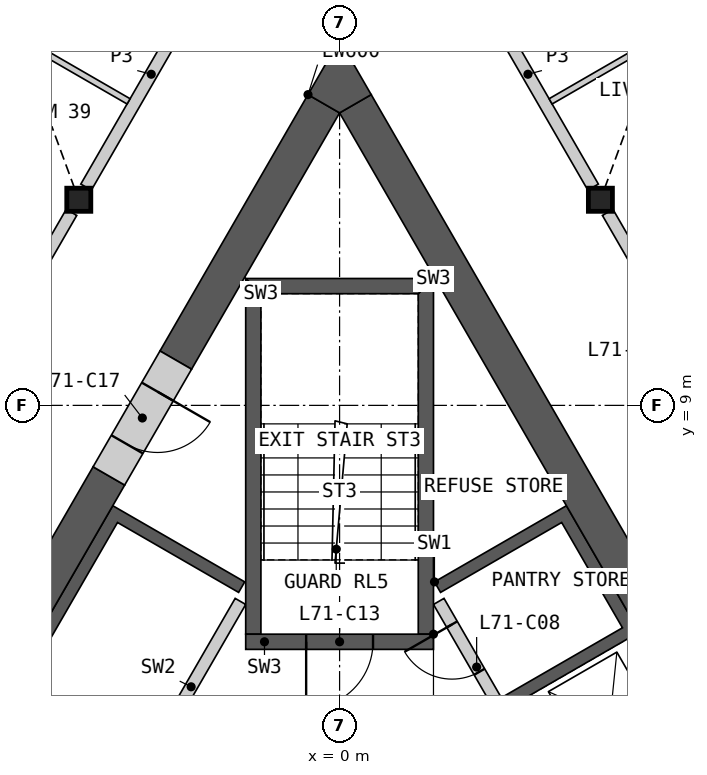
"""IFC4 building model, lengths in metres.
Left out: names, types, materials, properties, quantities, classifications, styles, units other than length and angle.
Written with IfcOpenShell. Run it as: python <this file> out.ifc"""

import sys

from ifc_helpers import new_model, si_unit, direction, frame, frame_2d, origin, origin_2d, place, context, subcontext, project, spatial, polyline, rectangle, i_section, outline, extrude, element, fill, save


model = new_model("IFC4")
c1 = context("Model", 3, precision=1e-05, world=origin(), true_north=direction((0.0, 1.0)))
c2 = subcontext(c1, "Body", "Model", "MODEL_VIEW")
j1 = project(units=[si_unit("LENGTHUNIT", "METRE"), si_unit("PLANEANGLEUNIT", "RADIAN")], contexts=[c1])
p1 = place(None, origin())
s1 = spatial("IfcSite", under=j1, at=p1, CompositionType="ELEMENT")
p2 = place(p1, origin())
s2 = spatial("IfcBuilding", under=s1, at=p2, CompositionType="ELEMENT")
p3 = place(p2, frame((0.0, 0.0, 322.2)))
s3 = spatial("IfcBuildingStorey", under=s2, at=p3, CompositionType="ELEMENT", Elevation=322.2)
for number, where, z_axis, x_axis in (
    (1, (-4.289, 12.382, 0.0), (0.0, 0.0, 1.0), (1.0, 0.0, 0.0)),
    (2, (4.289, 12.382, 0.0), (0.0, 0.0, 1.0), (1.0, 0.0, 0.0)),
):
    element("IfcColumn", number, at=place(p3, frame(where, z_axis=z_axis, x_axis=x_axis)), inside=s3, PredefinedType="COLUMN", context=c2, shape_type="SweptSolid", body=[
        extrude(i_section(OverallWidth=0.396, OverallDepth=0.381, WebThickness=0.019, FlangeThickness=0.03, at=origin_2d()), origin(), (0.0, 0.0, 1.0), 3.4),
    ])
p4 = place(p3, origin())
e3 = element("IfcWall", 3, at=p4, inside=s3, PredefinedType="SHEAR", context=c2, shape_type="SweptSolid", body=[
    extrude(outline(polyline([(1.561, 6.097), (3.731, 7.35), (8.231, -0.444), (6.061, -1.697), (5.96, -1.524), (7.952, -0.374), (6.952, 1.358), (4.96, 0.208), (4.861, 0.381), (6.852, 1.531), (5.852, 3.263), (3.861, 2.113), (3.76, 2.287), (5.752, 3.437), (4.752, 5.169), (2.76, 4.019), (2.66, 4.192), (4.652, 5.342), (3.652, 7.074), (1.66, 5.924), (1.561, 6.097)])), origin(), (0.0, 0.0, 1.0), 3.1),
])
p5 = place(p3, frame((5.817, -1.476, 0.0), z_axis=(0.0, 0.0, 1.0), x_axis=(-0.500002616675, 0.866023893041, 0.0)))
e4 = element("IfcWall", 4, at=p5, inside=s3, PredefinedType="SOLIDWALL", context=c2, shape_type="SweptSolid", body=[
    extrude(rectangle(XDim=8.373, YDim=0.2, at=frame_2d((4.187, 0.0))), origin(), (0.0, 0.0, 1.0), 3.1),
])
p6 = place(p5, frame((0.337, 0.0, 0.0)))
e5 = element("IfcOpeningElement", 5, at=p6, cuts=e4, PredefinedType="OPENING", context=c2, shape_type="SweptSolid", body=[
    extrude(rectangle(XDim=1.1, YDim=2.1, at=frame_2d((0.55, 1.05))), frame((0.0, 0.11, 0.0), z_axis=(0.0, -1.0, 0.0), x_axis=(1.0, 0.0, 0.0)), (0.0, 0.0, 1.0), 0.22),
])
p7 = place(p5, frame((2.537, 0.0, 0.0)))
e6 = element("IfcOpeningElement", 6, at=p7, cuts=e4, PredefinedType="OPENING", context=c2, shape_type="SweptSolid", body=[
    extrude(rectangle(XDim=1.1, YDim=2.1, at=frame_2d((0.55, 1.05))), frame((0.0, 0.11, 0.0), z_axis=(0.0, -1.0, 0.0), x_axis=(1.0, 0.0, 0.0)), (0.0, 0.0, 1.0), 0.22),
])
p8 = place(p5, frame((4.737, 0.0, 0.0)))
e7 = element("IfcOpeningElement", 7, at=p8, cuts=e4, PredefinedType="OPENING", context=c2, shape_type="SweptSolid", body=[
    extrude(rectangle(XDim=1.1, YDim=2.1, at=frame_2d((0.55, 1.05))), frame((0.0, 0.11, 0.0), z_axis=(0.0, -1.0, 0.0), x_axis=(1.0, 0.0, 0.0)), (0.0, 0.0, 1.0), 0.22),
])
p9 = place(p5, frame((7.037, 0.0, 0.0)))
e8 = element("IfcOpeningElement", 8, at=p9, cuts=e4, PredefinedType="OPENING", context=c2, shape_type="SweptSolid", body=[
    extrude(rectangle(XDim=0.9, YDim=2.1, at=frame_2d((0.45, 1.05))), frame((0.0, 0.11, 0.0), z_axis=(0.0, -1.0, 0.0), x_axis=(1.0, 0.0, 0.0)), (0.0, 0.0, 1.0), 0.22),
])
p10 = place(p3, origin())
e9 = element("IfcWall", 9, at=p10, inside=s3, PredefinedType="SHEAR", context=c2, shape_type="SweptSolid", body=[
    extrude(outline(polyline([(-4.96, 0.208), (-7.131, 1.461), (-3.731, 7.35), (-1.561, 6.097), (-1.66, 5.924), (-3.652, 7.074), (-6.852, 1.531), (-4.861, 0.381), (-4.96, 0.208)])), origin(), (0.0, 0.0, 1.0), 3.1),
])
p11 = place(p3, frame((-1.631, 5.776, 0.0), z_axis=(0.0, 0.0, 1.0), x_axis=(-0.499992876559, -0.866029516466, 0.0)))
e10 = element("IfcWall", 10, at=p11, inside=s3, PredefinedType="SOLIDWALL", context=c2, shape_type="SweptSolid", body=[
    extrude(rectangle(XDim=6.486, YDim=0.2, at=frame_2d((3.243, 0.0))), origin(), (0.0, 0.0, 1.0), 3.1),
])
p12 = place(p11, frame((2.637, 0.0, 0.0)))
e11 = element("IfcOpeningElement", 11, at=p12, cuts=e10, PredefinedType="OPENING", context=c2, shape_type="SweptSolid", body=[
    extrude(rectangle(XDim=0.9, YDim=2.1, at=frame_2d((0.45, 1.05))), frame((0.0, 0.11, 0.0), z_axis=(0.0, -1.0, 0.0), x_axis=(1.0, 0.0, 0.0)), (0.0, 0.0, 1.0), 0.22),
])
p13 = place(p3, origin())
e12 = element("IfcWall", 12, at=p13, inside=s3, PredefinedType="SHEAR", context=c2, shape_type="SweptSolid", body=[
    extrude(outline(polyline([(1.544, 5.237), (1.544, 11.087), (1.294, 10.837), (1.294, 5.237), (1.544, 5.237)])), origin(), (0.0, 0.0, 1.0), 3.1),
])
p14 = place(p3, origin())
e13 = element("IfcWall", 13, at=p14, inside=s3, PredefinedType="SHEAR", context=c2, shape_type="SweptSolid", body=[
    extrude(outline(polyline([(1.544, 11.087), (-1.544, 11.087), (-1.294, 10.837), (1.294, 10.837), (1.544, 11.087)])), origin(), (0.0, 0.0, 1.0), 3.1),
])
p15 = place(p3, origin())
e14 = element("IfcWall", 14, at=p15, inside=s3, PredefinedType="SHEAR", context=c2, shape_type="SweptSolid", body=[
    extrude(outline(polyline([(-1.294, 10.837), (-1.544, 11.087), (-1.544, 5.237), (-1.294, 5.237), (-1.294, 10.837)])), origin(), (0.0, 0.0, 1.0), 3.1),
])
p16 = place(p3, frame((1.544, 5.112, 0.0), z_axis=(0.0, 0.0, 1.0), x_axis=(-1.0, 0.0, 0.0)))
e15 = element("IfcWall", 15, at=p16, inside=s3, PredefinedType="SHEAR", context=c2, shape_type="SweptSolid", body=[
    extrude(rectangle(XDim=3.088, YDim=0.25, at=frame_2d((1.544, 0.0))), origin(), (0.0, 0.0, 1.0), 3.1),
])
p17 = place(p16, frame((0.994, 0.0, 0.0)))
e16 = element("IfcOpeningElement", 16, at=p17, cuts=e15, PredefinedType="OPENING", context=c2, shape_type="SweptSolid", body=[
    extrude(rectangle(XDim=1.1, YDim=2.1, at=frame_2d((0.55, 1.05))), frame((0.0, 0.135, 0.0), z_axis=(0.0, -1.0, 0.0), x_axis=(1.0, 0.0, 0.0)), (0.0, 0.0, 1.0), 0.27),
])
p18 = place(p3, frame((8.686, -0.634, 0.0), z_axis=(0.0, 0.0, 1.0), x_axis=(-0.500004601921, 0.866022746848, 0.0)))
e17 = element("IfcWall", 17, at=p18, inside=s3, PredefinedType="SHEAR", context=c2, shape_type="SweptSolid", body=[
    extrude(rectangle(XDim=16.853, YDim=0.6, at=frame_2d((8.426, 0.0))), origin(), (0.0, 0.0, 1.0), 3.1),
])
p19 = place(p3, frame((-3.794, 7.84, 0.0), z_axis=(0.0, 0.0, 1.0), x_axis=(-0.499974747889, -0.866039982607, 0.0)))
e18 = element("IfcWall", 18, at=p19, inside=s3, PredefinedType="SHEAR", context=c2, shape_type="SweptSolid", body=[
    extrude(rectangle(XDim=7.092, YDim=0.6, at=frame_2d((3.546, 0.0))), origin(), (0.0, 0.0, 1.0), 3.1),
])
p20 = place(p3, frame((-0.26, 13.961, 0.0), z_axis=(0.0, 0.0, 1.0), x_axis=(-0.50000604952, -0.866021911064, 0.0)))
e19 = element("IfcWall", 19, at=p20, inside=s3, PredefinedType="SHEAR", context=c2, shape_type="SweptSolid", body=[
    extrude(rectangle(XDim=4.869, YDim=0.6, at=frame_2d((2.434, 0.0))), origin(), (0.0, 0.0, 1.0), 3.1),
])
p21 = place(p3, origin())
e20 = element("IfcWall", 20, at=p21, inside=s3, PredefinedType="SHEAR", context=c2, shape_type="SweptSolid", body=[
    extrude(outline(polyline([(-0.52, 14.111), (0.0, 15.011), (0.52, 14.111), (0.0, 13.811), (-0.52, 14.111)])), origin(), (0.0, 0.0, 1.0), 3.1),
])
p22 = place(p3, frame((-2.694, 9.745, 0.0), z_axis=(0.0, 0.0, 1.0), x_axis=(-0.50002983664, -0.866008176907, 0.0)))
e21 = element("IfcWall", 21, at=p22, inside=s3, PredefinedType="SHEAR", context=c2, shape_type="SweptSolid", body=[
    extrude(rectangle(XDim=2.2, YDim=0.6, at=frame_2d((1.1, 0.0))), origin(), (0.0, 0.0, 1.0), 3.1),
])
p23 = place(p22, frame((0.6, 0.0, 0.0)))
e22 = element("IfcOpeningElement", 22, at=p23, cuts=e21, PredefinedType="OPENING", context=c2, shape_type="SweptSolid", body=[
    extrude(rectangle(XDim=1.0, YDim=2.1, at=frame_2d((0.5, 1.05))), frame((0.0, 0.31, 0.0), z_axis=(0.0, -1.0, 0.0), x_axis=(1.0, 0.0, 0.0)), (0.0, 0.0, 1.0), 0.62),
])
p24 = place(p3, frame((4.409, 12.174, 0.0), z_axis=(0.0, 0.0, 1.0), x_axis=(0.499984266882, -0.866034487114, 0.0)))
e23 = element("IfcWall", 23, at=p24, inside=s3, PredefinedType="PARTITIONING", context=c2, shape_type="SweptSolid", body=[
    extrude(rectangle(XDim=8.099, YDim=0.2, at=frame_2d((4.049, 0.0))), origin(), (0.0, 0.0, 1.0), 3.1),
])
p25 = place(p24, frame((6.269, 0.0, 0.0)))
e24 = element("IfcOpeningElement", 24, at=p25, cuts=e23, PredefinedType="OPENING", context=c2, shape_type="SweptSolid", body=[
    extrude(rectangle(XDim=1.0, YDim=2.1, at=frame_2d((0.5, 1.05))), frame((0.0, 0.11, 0.0), z_axis=(0.0, -1.0, 0.0), x_axis=(1.0, 0.0, 0.0)), (0.0, 0.0, 1.0), 0.22),
])
p26 = place(p24, frame((1.164, 0.0, 0.0)))
e25 = element("IfcOpeningElement", 25, at=p26, cuts=e23, PredefinedType="OPENING", context=c2, shape_type="SweptSolid", body=[
    extrude(rectangle(XDim=1.0, YDim=2.1, at=frame_2d((0.5, 1.05))), frame((0.0, 0.11, 0.0), z_axis=(0.0, -1.0, 0.0), x_axis=(1.0, 0.0, 0.0)), (0.0, 0.0, 1.0), 0.22),
])
p27 = place(p3, frame((-8.458, 5.16, 0.0), z_axis=(0.0, 0.0, 1.0), x_axis=(0.499984266882, 0.866034487114, 0.0)))
e26 = element("IfcWall", 26, at=p27, inside=s3, PredefinedType="PARTITIONING", context=c2, shape_type="SweptSolid", body=[
    extrude(rectangle(XDim=8.099, YDim=0.2, at=frame_2d((4.049, 0.0))), origin(), (0.0, 0.0, 1.0), 3.1),
])
p28 = place(p27, frame((5.935, 0.0, 0.0)))
e27 = element("IfcOpeningElement", 27, at=p28, cuts=e26, PredefinedType="OPENING", context=c2, shape_type="SweptSolid", body=[
    extrude(rectangle(XDim=1.0, YDim=2.1, at=frame_2d((0.5, 1.05))), frame((0.0, 0.11, 0.0), z_axis=(0.0, -1.0, 0.0), x_axis=(1.0, 0.0, 0.0)), (0.0, 0.0, 1.0), 0.22),
])
p29 = place(p27, frame((0.83, 0.0, 0.0)))
e28 = element("IfcOpeningElement", 28, at=p29, cuts=e26, PredefinedType="OPENING", context=c2, shape_type="SweptSolid", body=[
    extrude(rectangle(XDim=1.0, YDim=2.1, at=frame_2d((0.5, 1.05))), frame((0.0, 0.11, 0.0), z_axis=(0.0, -1.0, 0.0), x_axis=(1.0, 0.0, 0.0)), (0.0, 0.0, 1.0), 0.22),
])
for number, where, z_axis, x_axis in (
    (29, (2.025, 16.303, 0.0), (0.0, 0.0, 1.0), (0.5, -0.866, 0.0)),
    (30, (-4.169, 12.59, 0.0), (0.0, 0.0, 1.0), (0.5, 0.866, 0.0)),
):
    element("IfcWall", number, at=place(p3, frame(where, z_axis=z_axis, x_axis=x_axis)), inside=s3, PredefinedType="PARTITIONING", context=c2, shape_type="SweptSolid", body=[
        extrude(rectangle(XDim=4.288, YDim=0.2, at=frame_2d((2.144, 0.0))), origin(), (0.0, 0.0, 1.0), 3.1),
    ])
p30 = place(p3, frame((-14.417, 20.32, 0.0), z_axis=(0.0, 0.0, 1.0), x_axis=(0.866021216079, -0.500007253249, 0.0)))
e31 = element("IfcWall", 31, at=p30, inside=s3, PredefinedType="PARTITIONING", context=c2, shape_type="SweptSolid", body=[
    extrude(rectangle(XDim=12.639, YDim=0.1, at=frame_2d((6.32, 0.0))), origin(), (0.0, 0.0, 1.0), 2.33),
])
p31 = place(p30, frame((3.375, 0.0, 0.0)))
e32 = element("IfcOpeningElement", 32, at=p31, cuts=e31, PredefinedType="OPENING", context=c2, shape_type="SweptSolid", body=[
    extrude(rectangle(XDim=0.95, YDim=2.1, at=frame_2d((0.475, 1.05))), frame((0.0, 0.06, 0.0), z_axis=(0.0, -1.0, 0.0), x_axis=(1.0, 0.0, 0.0)), (0.0, 0.0, 1.0), 0.12),
])
p32 = place(p3, frame((3.47, 14.0, 0.0), z_axis=(0.0, 0.0, 1.0), x_axis=(0.866021216079, 0.500007253249, 0.0)))
e33 = element("IfcWall", 33, at=p32, inside=s3, PredefinedType="PARTITIONING", context=c2, shape_type="SweptSolid", body=[
    extrude(rectangle(XDim=12.639, YDim=0.1, at=frame_2d((6.32, 0.0))), origin(), (0.0, 0.0, 1.0), 2.33),
])
p33 = place(p32, frame((8.314, 0.0, 0.0)))
e34 = element("IfcOpeningElement", 34, at=p33, cuts=e33, PredefinedType="OPENING", context=c2, shape_type="SweptSolid", body=[
    extrude(rectangle(XDim=0.95, YDim=2.1, at=frame_2d((0.475, 1.05))), frame((0.0, 0.06, 0.0), z_axis=(0.0, -1.0, 0.0), x_axis=(1.0, 0.0, 0.0)), (0.0, 0.0, 1.0), 0.12),
])
p34 = place(p9, origin())
e35 = element("IfcDoor", 35, at=p34, inside=s3, OperationType="SINGLE_SWING_RIGHT", PredefinedType="DOOR", context=c2, shape_type="SweptSolid", body=[
    extrude(rectangle(XDim=0.9, YDim=2.1, at=frame_2d((0.45, 1.05))), frame((0.0, 0.025, 0.0), z_axis=(0.0, -1.0, 0.0), x_axis=(1.0, 0.0, 0.0)), (0.0, 0.0, 1.0), 0.05),
])
fill(e8, e35)
p35 = place(p17, origin())
e36 = element("IfcDoor", 36, at=p35, inside=s3, OperationType="SINGLE_SWING_RIGHT", PredefinedType="DOOR", context=c2, shape_type="SweptSolid", body=[
    extrude(rectangle(XDim=1.1, YDim=2.1, at=frame_2d((0.55, 1.05))), frame((0.0, 0.025, 0.0), z_axis=(0.0, -1.0, 0.0), x_axis=(1.0, 0.0, 0.0)), (0.0, 0.0, 1.0), 0.05),
])
fill(e16, e36)
p36 = place(p23, origin())
e37 = element("IfcDoor", 37, at=p36, inside=s3, OperationType="SINGLE_SWING_LEFT", PredefinedType="DOOR", context=c2, shape_type="SweptSolid", body=[
    extrude(rectangle(XDim=1.0, YDim=2.1, at=frame_2d((0.5, 1.05))), frame((0.0, 0.055, 0.0), z_axis=(0.0, -1.0, 0.0), x_axis=(1.0, 0.0, 0.0)), (0.0, 0.0, 1.0), 0.05),
])
fill(e22, e37)
save(model, sys.argv[1])
